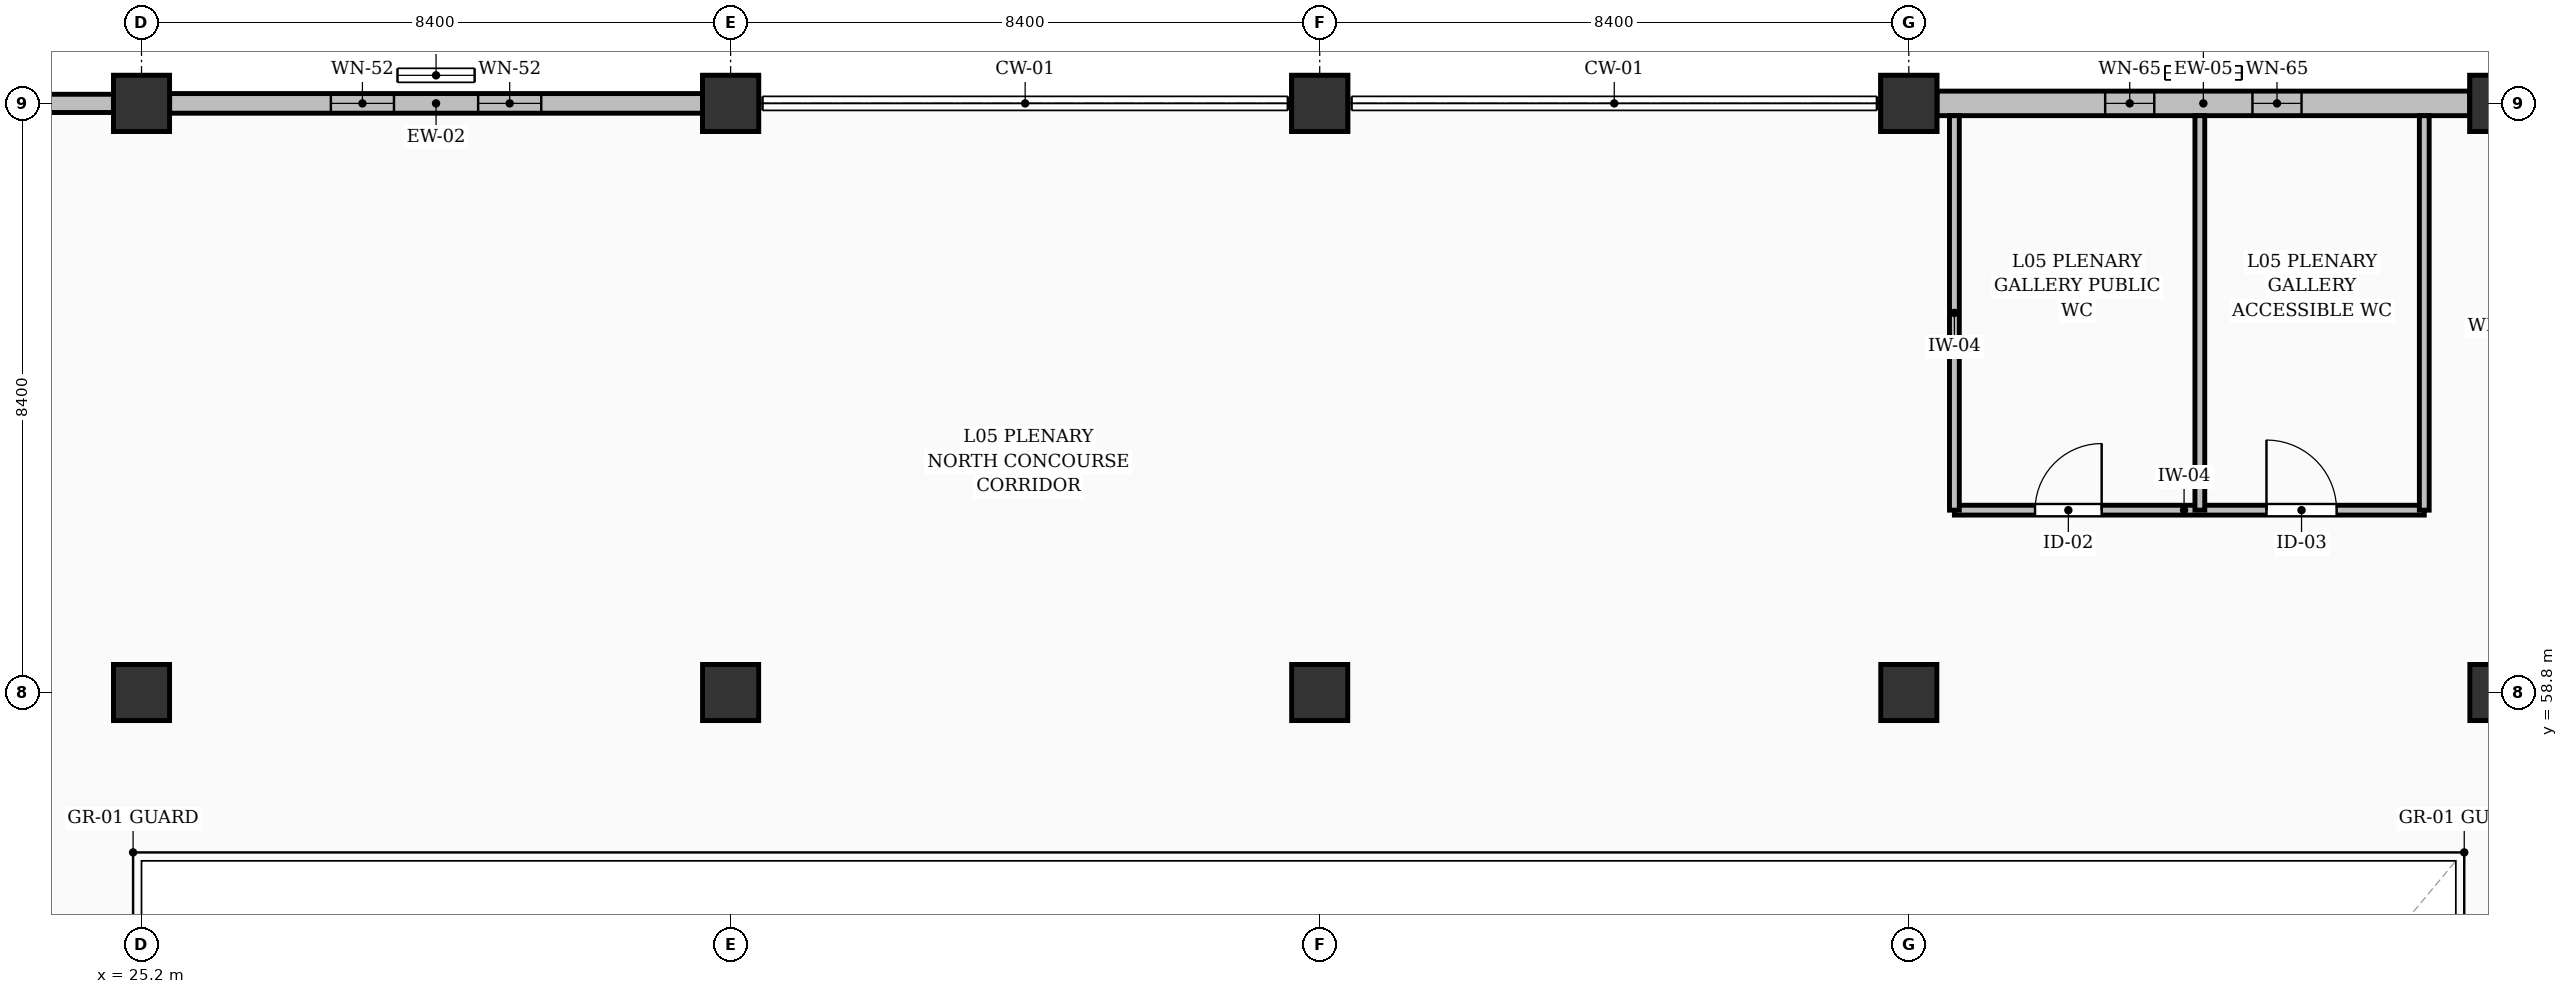
"""IFC4 building model, lengths in metres.
Left out: names, types, materials, properties, quantities, classifications, styles, units other than length and angle.
Written with IfcOpenShell. Run it as: python <this file> out.ifc"""

import sys

from ifc_helpers import new_model, si_unit, direction, frame, frame_2d, origin, origin_2d, place, context, subcontext, project, spatial, rectangle, extrude, element, fill, save


model = new_model("IFC4")
c1 = context("Model", 3, precision=1e-05, world=origin(), true_north=direction((0.0, 1.0)))
c2 = subcontext(c1, "Body", "Model", "MODEL_VIEW")
j1 = project(units=[si_unit("LENGTHUNIT", "METRE"), si_unit("PLANEANGLEUNIT", "RADIAN")], contexts=[c1])
p1 = place(None, origin())
s1 = spatial("IfcSite", under=j1, at=p1, CompositionType="ELEMENT")
p2 = place(p1, origin())
s2 = spatial("IfcBuilding", under=s1, at=p2, CompositionType="ELEMENT")
p3 = place(p2, frame((0.0, 0.0, 18.48)))
s3 = spatial("IfcBuildingStorey", under=s2, at=p3, CompositionType="ELEMENT", Elevation=18.48)
for number, where, z_axis, x_axis in (
    (1, (25.2, 58.8, 0.0), (0.0, 0.0, 1.0), (1.0, 0.0, 0.0)),
    (2, (25.2, 67.2, 0.0), (0.0, 0.0, 1.0), (1.0, 0.0, 0.0)),
    (3, (33.6, 58.8, 0.0), (0.0, 0.0, 1.0), (1.0, 0.0, 0.0)),
    (4, (33.6, 67.2, 0.0), (0.0, 0.0, 1.0), (1.0, 0.0, 0.0)),
    (5, (42.0, 58.8, 0.0), (0.0, 0.0, 1.0), (1.0, 0.0, 0.0)),
    (6, (42.0, 67.2, 0.0), (0.0, 0.0, 1.0), (1.0, 0.0, 0.0)),
    (7, (50.4, 58.8, 0.0), (0.0, 0.0, 1.0), (1.0, 0.0, 0.0)),
    (8, (50.4, 67.2, 0.0), (0.0, 0.0, 1.0), (1.0, 0.0, 0.0)),
    (9, (58.8, 58.8, 0.0), (0.0, 0.0, 1.0), (1.0, 0.0, 0.0)),
    (10, (58.8, 67.2, 0.0), (0.0, 0.0, 1.0), (1.0, 0.0, 0.0)),
):
    element("IfcColumn", number, at=place(p3, frame(where, z_axis=z_axis, x_axis=x_axis)), inside=s3, PredefinedType="COLUMN", context=c2, shape_type="SweptSolid", body=[
        extrude(rectangle(XDim=0.8, YDim=0.8, at=origin_2d()), origin(), (0.0, 0.0, 1.0), 3.36),
    ])
p4 = place(p3, frame((25.2, 67.2, 3.36), z_axis=(0.0, 0.0, 1.0), x_axis=(1.0, 0.0, 0.0)))
e11 = element("IfcColumn", 11, at=p4, inside=s3, PredefinedType="COLUMN", context=c2, shape_type="SweptSolid", body=[
    extrude(rectangle(XDim=0.8, YDim=0.8, at=origin_2d()), origin(), (0.0, 0.0, 1.0), 6.593),
])
p5 = place(p3, frame((33.6, 67.2, 3.36), z_axis=(0.0, 0.0, 1.0), x_axis=(1.0, 0.0, 0.0)))
e12 = element("IfcColumn", 12, at=p5, inside=s3, PredefinedType="COLUMN", context=c2, shape_type="SweptSolid", body=[
    extrude(rectangle(XDim=0.8, YDim=0.8, at=origin_2d()), origin(), (0.0, 0.0, 1.0), 6.089),
])
p6 = place(p3, frame((42.0, 67.2, 3.36), z_axis=(0.0, 0.0, 1.0), x_axis=(1.0, 0.0, 0.0)))
e13 = element("IfcColumn", 13, at=p6, inside=s3, PredefinedType="COLUMN", context=c2, shape_type="SweptSolid", body=[
    extrude(rectangle(XDim=0.8, YDim=0.8, at=origin_2d()), origin(), (0.0, 0.0, 1.0), 6.593),
])
p7 = place(p3, frame((50.4, 67.2, 3.36), z_axis=(0.0, 0.0, 1.0), x_axis=(1.0, 0.0, 0.0)))
e14 = element("IfcColumn", 14, at=p7, inside=s3, PredefinedType="COLUMN", context=c2, shape_type="SweptSolid", body=[
    extrude(rectangle(XDim=0.8, YDim=0.8, at=origin_2d()), origin(), (0.0, 0.0, 1.0), 8.104),
])
p8 = place(p3, frame((58.8, 67.2, 3.36), z_axis=(0.0, 0.0, 1.0), x_axis=(1.0, 0.0, 0.0)))
e15 = element("IfcColumn", 15, at=p8, inside=s3, PredefinedType="COLUMN", context=c2, shape_type="SweptSolid", body=[
    extrude(rectangle(XDim=0.8, YDim=0.8, at=origin_2d()), origin(), (0.0, 0.0, 1.0), 10.623),
])
p9 = place(p3, frame((17.201, 67.2, 0.0), z_axis=(0.0, 0.0, 1.0), x_axis=(1.0, 0.0, 0.0)))
e16 = element("IfcWall", 16, at=p9, inside=s3, PredefinedType="SOLIDWALL", context=c2, shape_type="SweptSolid", body=[
    extrude(rectangle(XDim=7.598, YDim=0.26, at=frame_2d((3.799, 0.0))), origin(), (0.0, 0.0, 1.0), 2.494),
])
p10 = place(p9, frame((2.389, 0.0, 0.3)))
e17 = element("IfcOpeningElement", 17, at=p10, cuts=e16, PredefinedType="OPENING", context=c2, shape_type="SweptSolid", body=[
    extrude(rectangle(XDim=0.72, YDim=1.95, at=frame_2d((0.36, 0.975))), frame((0.0, 0.14, 0.0), z_axis=(0.0, -1.0, 0.0), x_axis=(1.0, 0.0, 0.0)), (0.0, 0.0, 1.0), 0.28),
])
p11 = place(p9, frame((4.489, 0.0, 0.3)))
e18 = element("IfcOpeningElement", 18, at=p11, cuts=e16, PredefinedType="OPENING", context=c2, shape_type="SweptSolid", body=[
    extrude(rectangle(XDim=0.72, YDim=1.95, at=frame_2d((0.36, 0.975))), frame((0.0, 0.14, 0.0), z_axis=(0.0, -1.0, 0.0), x_axis=(1.0, 0.0, 0.0)), (0.0, 0.0, 1.0), 0.28),
])
p12 = place(p3, frame((25.601, 67.2, 0.0), z_axis=(0.0, 0.0, 1.0), x_axis=(1.0, 0.0, 0.0)))
e19 = element("IfcWall", 19, at=p12, inside=s3, PredefinedType="SOLIDWALL", context=c2, shape_type="SweptSolid", body=[
    extrude(rectangle(XDim=7.598, YDim=0.28, at=frame_2d((3.799, 0.0))), origin(), (0.0, 0.0, 1.0), 2.494),
])
p13 = place(p12, frame((2.299, 0.0, 0.3)))
e20 = element("IfcOpeningElement", 20, at=p13, cuts=e19, PredefinedType="OPENING", context=c2, shape_type="SweptSolid", body=[
    extrude(rectangle(XDim=0.9, YDim=1.95, at=frame_2d((0.45, 0.975))), frame((0.0, 0.15, 0.0), z_axis=(0.0, -1.0, 0.0), x_axis=(1.0, 0.0, 0.0)), (0.0, 0.0, 1.0), 0.3),
])
p14 = place(p12, frame((4.399, 0.0, 0.3)))
e21 = element("IfcOpeningElement", 21, at=p14, cuts=e19, PredefinedType="OPENING", context=c2, shape_type="SweptSolid", body=[
    extrude(rectangle(XDim=0.9, YDim=1.95, at=frame_2d((0.45, 0.975))), frame((0.0, 0.15, 0.0), z_axis=(0.0, -1.0, 0.0), x_axis=(1.0, 0.0, 0.0)), (0.0, 0.0, 1.0), 0.3),
])
p15 = place(p3, frame((50.801, 67.2, 0.0), z_axis=(0.0, 0.0, 1.0), x_axis=(1.0, 0.0, 0.0)))
e22 = element("IfcWall", 22, at=p15, inside=s3, PredefinedType="SOLIDWALL", context=c2, shape_type="SweptSolid", body=[
    extrude(rectangle(XDim=7.598, YDim=0.35, at=frame_2d((3.799, 0.0))), origin(), (0.0, 0.0, 1.0), 2.494),
])
p16 = place(p15, frame((2.399, 0.0, 0.3)))
e23 = element("IfcOpeningElement", 23, at=p16, cuts=e22, PredefinedType="OPENING", context=c2, shape_type="SweptSolid", body=[
    extrude(rectangle(XDim=0.7, YDim=1.9, at=frame_2d((0.35, 0.95))), frame((0.0, 0.185, 0.0), z_axis=(0.0, -1.0, 0.0), x_axis=(1.0, 0.0, 0.0)), (0.0, 0.0, 1.0), 0.37),
])
p17 = place(p15, frame((4.499, 0.0, 0.3)))
e24 = element("IfcOpeningElement", 24, at=p17, cuts=e22, PredefinedType="OPENING", context=c2, shape_type="SweptSolid", body=[
    extrude(rectangle(XDim=0.7, YDim=1.9, at=frame_2d((0.35, 0.95))), frame((0.0, 0.185, 0.0), z_axis=(0.0, -1.0, 0.0), x_axis=(1.0, 0.0, 0.0)), (0.0, 0.0, 1.0), 0.37),
])
p18 = place(p3, frame((51.05, 61.4, 0.0), z_axis=(0.0, 0.0, 1.0), x_axis=(1.0, 0.0, 0.0)))
e25 = element("IfcWall", 25, at=p18, inside=s3, PredefinedType="PARTITIONING", context=c2, shape_type="SweptSolid", body=[
    extrude(rectangle(XDim=6.7, YDim=0.14, at=frame_2d((3.35, 0.0))), origin(), (0.0, 0.0, 1.0), 3.125),
])
p19 = place(p18, frame((1.15, 0.0, 0.0)))
e26 = element("IfcOpeningElement", 26, at=p19, cuts=e25, PredefinedType="OPENING", context=c2, shape_type="SweptSolid", body=[
    extrude(rectangle(XDim=0.95, YDim=2.1, at=frame_2d((0.475, 1.05))), frame((0.0, 0.08, 0.0), z_axis=(0.0, -1.0, 0.0), x_axis=(1.0, 0.0, 0.0)), (0.0, 0.0, 1.0), 0.16),
])
p20 = place(p18, frame((4.45, 0.0, 0.0)))
e27 = element("IfcOpeningElement", 27, at=p20, cuts=e25, PredefinedType="OPENING", context=c2, shape_type="SweptSolid", body=[
    extrude(rectangle(XDim=1.0, YDim=2.1, at=frame_2d((0.5, 1.05))), frame((0.0, 0.08, 0.0), z_axis=(0.0, -1.0, 0.0), x_axis=(1.0, 0.0, 0.0)), (0.0, 0.0, 1.0), 0.16),
])
for number, where, z_axis, x_axis in (
    (28, (51.05, 61.4, 0.0), (0.0, 0.0, 1.0), (0.0, 1.0, 0.0)),
    (29, (54.55, 61.4, 0.0), (0.0, 0.0, 1.0), (0.0, 1.0, 0.0)),
    (30, (57.75, 61.4, 0.0), (0.0, 0.0, 1.0), (0.0, 1.0, 0.0)),
):
    element("IfcWall", number, at=place(p3, frame(where, z_axis=z_axis, x_axis=x_axis)), inside=s3, PredefinedType="PARTITIONING", context=c2, shape_type="SweptSolid", body=[
        extrude(rectangle(XDim=5.625, YDim=0.14, at=frame_2d((2.812, 0.0))), origin(), (0.0, 0.0, 1.0), 3.125),
    ])
p21 = place(p13, origin())
e31 = element("IfcWindow", 31, at=p21, inside=s3, PartitioningType="SINGLE_PANEL", PredefinedType="WINDOW", context=c2, shape_type="SweptSolid", body=[
    extrude(rectangle(XDim=0.9, YDim=1.95, at=frame_2d((0.45, 0.975))), frame((0.0, 0.03, 0.0), z_axis=(0.0, -1.0, 0.0), x_axis=(1.0, 0.0, 0.0)), (0.0, 0.0, 1.0), 0.06),
])
fill(e20, e31)
p22 = place(p14, origin())
e32 = element("IfcWindow", 32, at=p22, inside=s3, PartitioningType="SINGLE_PANEL", PredefinedType="WINDOW", context=c2, shape_type="SweptSolid", body=[
    extrude(rectangle(XDim=0.9, YDim=1.95, at=frame_2d((0.45, 0.975))), frame((0.0, 0.03, 0.0), z_axis=(0.0, -1.0, 0.0), x_axis=(1.0, 0.0, 0.0)), (0.0, 0.0, 1.0), 0.06),
])
fill(e21, e32)
p23 = place(p16, origin())
e33 = element("IfcWindow", 33, at=p23, inside=s3, PartitioningType="SINGLE_PANEL", PredefinedType="WINDOW", context=c2, shape_type="SweptSolid", body=[
    extrude(rectangle(XDim=0.7, YDim=1.9, at=frame_2d((0.35, 0.95))), frame((0.0, 0.03, 0.0), z_axis=(0.0, -1.0, 0.0), x_axis=(1.0, 0.0, 0.0)), (0.0, 0.0, 1.0), 0.06),
])
fill(e23, e33)
p24 = place(p17, origin())
e34 = element("IfcWindow", 34, at=p24, inside=s3, PartitioningType="SINGLE_PANEL", PredefinedType="WINDOW", context=c2, shape_type="SweptSolid", body=[
    extrude(rectangle(XDim=0.7, YDim=1.9, at=frame_2d((0.35, 0.95))), frame((0.0, 0.03, 0.0), z_axis=(0.0, -1.0, 0.0), x_axis=(1.0, 0.0, 0.0)), (0.0, 0.0, 1.0), 0.06),
])
fill(e24, e34)
p25 = place(p19, origin())
e35 = element("IfcDoor", 35, at=p25, inside=s3, OperationType="SINGLE_SWING_RIGHT", PredefinedType="DOOR", context=c2, shape_type="SweptSolid", body=[
    extrude(rectangle(XDim=0.95, YDim=2.1, at=frame_2d((0.475, 1.05))), frame((0.0, 0.025, 0.0), z_axis=(0.0, -1.0, 0.0), x_axis=(1.0, 0.0, 0.0)), (0.0, 0.0, 1.0), 0.05),
])
fill(e26, e35)
p26 = place(p20, origin())
e36 = element("IfcDoor", 36, at=p26, inside=s3, OperationType="SINGLE_SWING_LEFT", PredefinedType="DOOR", context=c2, shape_type="SweptSolid", body=[
    extrude(rectangle(XDim=1.0, YDim=2.1, at=frame_2d((0.5, 1.05))), frame((0.0, 0.025, 0.0), z_axis=(0.0, -1.0, 0.0), x_axis=(1.0, 0.0, 0.0)), (0.0, 0.0, 1.0), 0.05),
])
fill(e27, e36)
save(model, sys.argv[1])
